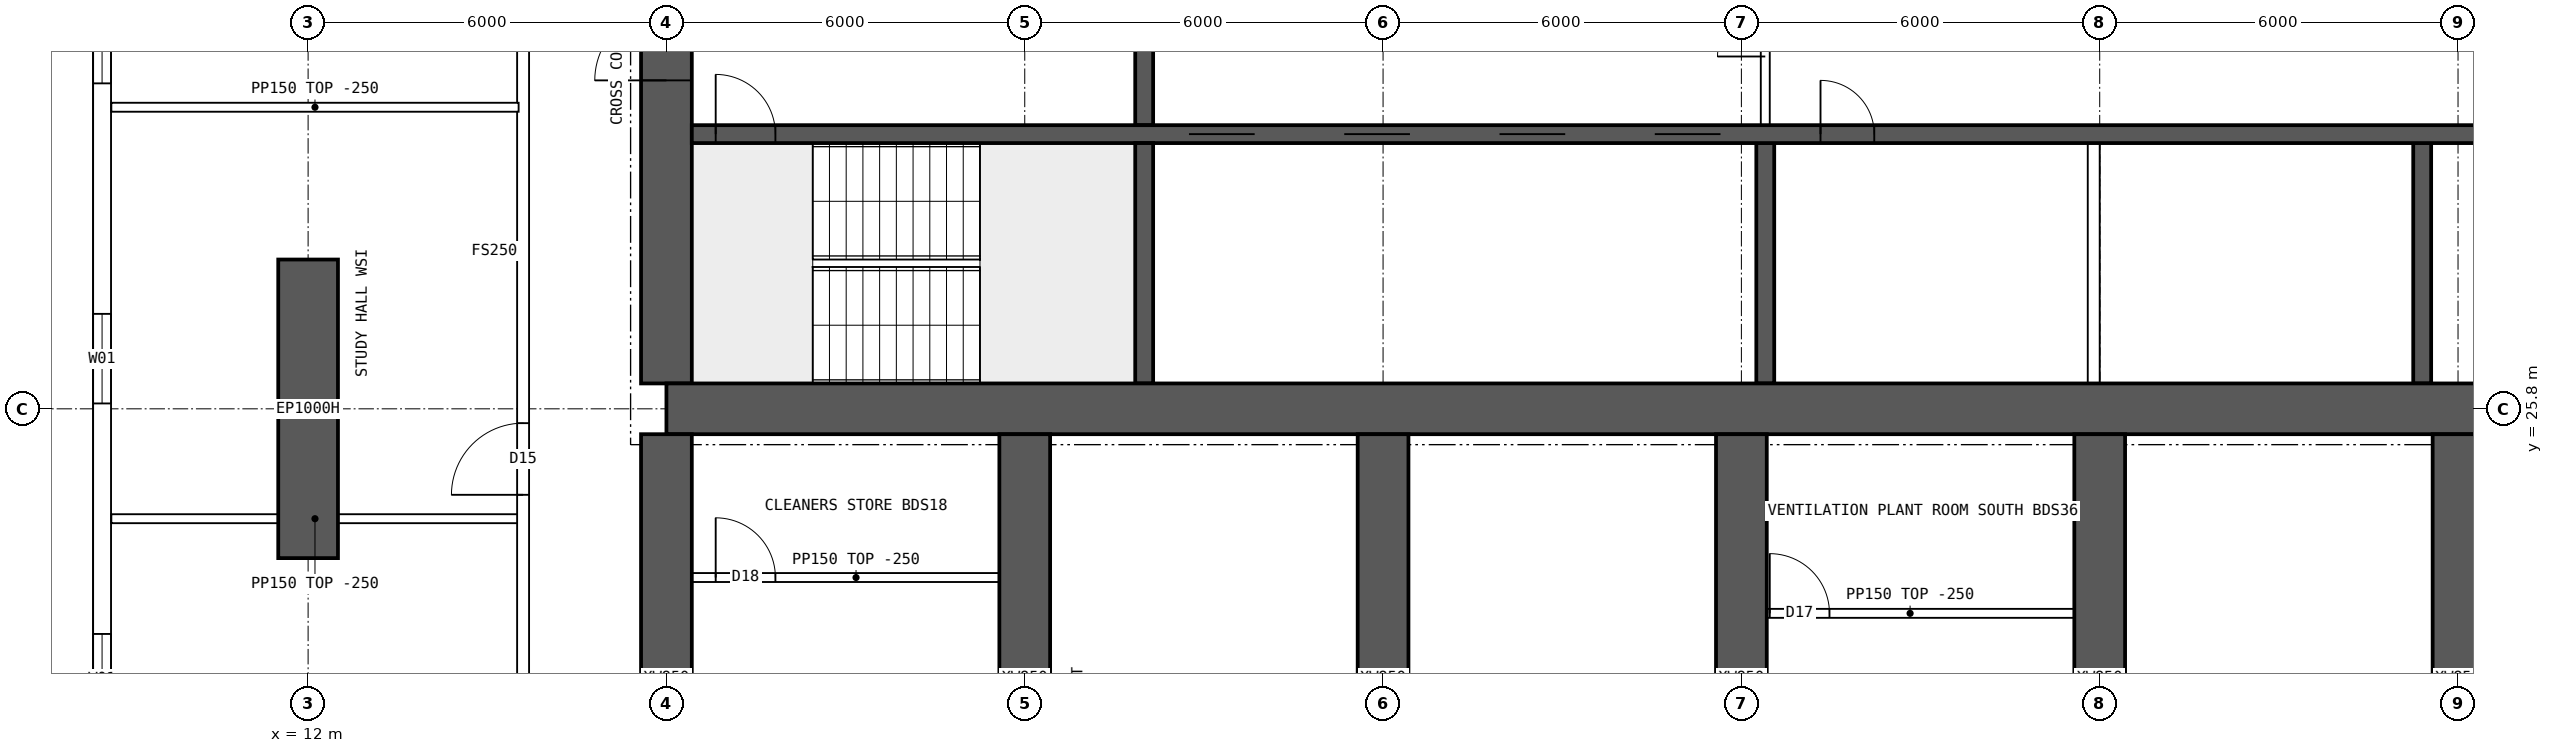
"""IFC4 building model, lengths in metres.
Left out: names, types, materials, properties, quantities, classifications, styles, units other than length and angle.
Written with IfcOpenShell. Run it as: python <this file> out.ifc"""

import sys

from ifc_helpers import new_model, si_unit, direction, frame, frame_2d, origin, place, context, subcontext, project, spatial, polyline, rectangle, outline, extrude, element, fill, save


model = new_model("IFC4")
c1 = context("Model", 3, precision=1e-05, world=origin(), true_north=direction((0.0, 1.0)))
c2 = subcontext(c1, "Body", "Model", "MODEL_VIEW")
j1 = project(units=[si_unit("LENGTHUNIT", "METRE"), si_unit("PLANEANGLEUNIT", "RADIAN")], contexts=[c1])
p1 = place(None, origin())
s1 = spatial("IfcSite", under=j1, at=p1, CompositionType="ELEMENT")
p2 = place(p1, origin())
s2 = spatial("IfcBuilding", under=s1, at=p2, CompositionType="ELEMENT")
p3 = place(p2, frame((0.0, 0.0, 167.35)))
s3 = spatial("IfcBuildingStorey", under=s2, at=p3, CompositionType="ELEMENT", Elevation=167.35)
p4 = place(p3, frame((12.0, 23.3, 0.0), z_axis=(0.0, 0.0, 1.0), x_axis=(0.0, 1.0, 0.0)))
e1 = element("IfcWall", 1, at=p4, inside=s3, PredefinedType="SHEAR", context=c2, shape_type="SweptSolid", body=[
    extrude(rectangle(XDim=5.0, YDim=1.0, at=frame_2d((2.5, 0.0))), origin(), (0.0, 0.0, 1.0), 3.75),
])
p5 = place(p3, frame((18.0, 25.8, 0.0), z_axis=(0.0, 0.0, 1.0), x_axis=(1.0, 0.0, 0.0)))
e2 = element("IfcWall", 2, at=p5, inside=s3, PredefinedType="SHEAR", context=c2, shape_type="SweptSolid", body=[
    extrude(rectangle(XDim=48.0, YDim=0.85, at=frame_2d((24.0, 0.0))), origin(), (0.0, 0.0, 1.0), 3.75),
])
p6 = place(p3, frame((18.0, 26.225, 0.0), z_axis=(0.0, 0.0, 1.0), x_axis=(0.0, 1.0, 0.0)))
e3 = element("IfcWall", 3, at=p6, inside=s3, PredefinedType="SHEAR", context=c2, shape_type="SweptSolid", body=[
    extrude(rectangle(XDim=11.55, YDim=0.85, at=frame_2d((5.775, 0.0))), origin(), (0.0, 0.0, 1.0), 3.75),
])
p7 = place(p6, frame((5.075, 0.0, 0.0)))
e4 = element("IfcOpeningElement", 4, at=p7, cuts=e3, PredefinedType="OPENING", context=c2, shape_type="SweptSolid", body=[
    extrude(rectangle(XDim=1.2, YDim=2.1, at=frame_2d((0.6, 1.05))), frame((0.0, 0.435, 0.0), z_axis=(0.0, -1.0, 0.0), x_axis=(1.0, 0.0, 0.0)), (0.0, 0.0, 1.0), 0.87),
])
p8 = place(p3, frame((18.425, 30.4, 0.0), z_axis=(0.0, 0.0, 1.0), x_axis=(1.0, 0.0, 0.0)))
e5 = element("IfcWall", 5, at=p8, inside=s3, PredefinedType="SHEAR", context=c2, shape_type="SweptSolid", body=[
    extrude(rectangle(XDim=47.15, YDim=0.3, at=frame_2d((23.575, 0.0))), origin(), (0.0, 0.0, 1.0), 3.75),
])
p9 = place(p8, frame((0.4, 0.0, 0.0)))
e6 = element("IfcOpeningElement", 6, at=p9, cuts=e5, PredefinedType="OPENING", context=c2, shape_type="SweptSolid", body=[
    extrude(rectangle(XDim=1.0, YDim=2.1, at=frame_2d((0.5, 1.05))), frame((0.0, 0.16, 0.0), z_axis=(0.0, -1.0, 0.0), x_axis=(1.0, 0.0, 0.0)), (0.0, 0.0, 1.0), 0.32),
])
p10 = place(p8, frame((45.75, 0.0, 0.0)))
e7 = element("IfcOpeningElement", 7, at=p10, cuts=e5, PredefinedType="OPENING", context=c2, shape_type="SweptSolid", body=[
    extrude(rectangle(XDim=1.0, YDim=2.1, at=frame_2d((0.5, 1.05))), frame((0.0, 0.16, 0.0), z_axis=(0.0, -1.0, 0.0), x_axis=(1.0, 0.0, 0.0)), (0.0, 0.0, 1.0), 0.32),
])
p11 = place(p8, frame((8.325, 0.0, 0.0)))
e8 = element("IfcOpeningElement", 8, at=p11, cuts=e5, PredefinedType="OPENING", context=c2, shape_type="SweptSolid", body=[
    extrude(rectangle(XDim=1.1, YDim=2.1, at=frame_2d((0.55, 1.05))), frame((0.0, 0.16, 0.0), z_axis=(0.0, -1.0, 0.0), x_axis=(1.0, 0.0, 0.0)), (0.0, 0.0, 1.0), 0.32),
])
p12 = place(p8, frame((10.925, 0.0, 0.0)))
e9 = element("IfcOpeningElement", 9, at=p12, cuts=e5, PredefinedType="OPENING", context=c2, shape_type="SweptSolid", body=[
    extrude(rectangle(XDim=1.1, YDim=2.1, at=frame_2d((0.55, 1.05))), frame((0.0, 0.16, 0.0), z_axis=(0.0, -1.0, 0.0), x_axis=(1.0, 0.0, 0.0)), (0.0, 0.0, 1.0), 0.32),
])
p13 = place(p8, frame((13.525, 0.0, 0.0)))
e10 = element("IfcOpeningElement", 10, at=p13, cuts=e5, PredefinedType="OPENING", context=c2, shape_type="SweptSolid", body=[
    extrude(rectangle(XDim=1.1, YDim=2.1, at=frame_2d((0.55, 1.05))), frame((0.0, 0.16, 0.0), z_axis=(0.0, -1.0, 0.0), x_axis=(1.0, 0.0, 0.0)), (0.0, 0.0, 1.0), 0.32),
])
p14 = place(p8, frame((16.125, 0.0, 0.0)))
e11 = element("IfcOpeningElement", 11, at=p14, cuts=e5, PredefinedType="OPENING", context=c2, shape_type="SweptSolid", body=[
    extrude(rectangle(XDim=1.1, YDim=2.1, at=frame_2d((0.55, 1.05))), frame((0.0, 0.16, 0.0), z_axis=(0.0, -1.0, 0.0), x_axis=(1.0, 0.0, 0.0)), (0.0, 0.0, 1.0), 0.32),
])
p15 = place(p8, frame((18.9, 0.0, 0.0)))
e12 = element("IfcOpeningElement", 12, at=p15, cuts=e5, PredefinedType="OPENING", context=c2, shape_type="SweptSolid", body=[
    extrude(rectangle(XDim=0.9, YDim=2.1, at=frame_2d((0.45, 1.05))), frame((0.0, 0.16, 0.0), z_axis=(0.0, -1.0, 0.0), x_axis=(1.0, 0.0, 0.0)), (0.0, 0.0, 1.0), 0.32),
])
p16 = place(p8, frame((30.192, 0.0, 0.0)))
e13 = element("IfcOpeningElement", 13, at=p16, cuts=e5, PredefinedType="OPENING", context=c2, shape_type="SweptSolid", body=[
    extrude(rectangle(XDim=1.1, YDim=2.1, at=frame_2d((0.55, 1.05))), frame((0.0, 0.16, 0.0), z_axis=(0.0, -1.0, 0.0), x_axis=(1.0, 0.0, 0.0)), (0.0, 0.0, 1.0), 0.32),
])
p17 = place(p8, frame((33.725, 0.0, 0.0)))
e14 = element("IfcOpeningElement", 14, at=p17, cuts=e5, PredefinedType="OPENING", context=c2, shape_type="SweptSolid", body=[
    extrude(rectangle(XDim=1.1, YDim=2.1, at=frame_2d((0.55, 1.05))), frame((0.0, 0.16, 0.0), z_axis=(0.0, -1.0, 0.0), x_axis=(1.0, 0.0, 0.0)), (0.0, 0.0, 1.0), 0.32),
])
p18 = place(p8, frame((37.258, 0.0, 0.0)))
e15 = element("IfcOpeningElement", 15, at=p18, cuts=e5, PredefinedType="OPENING", context=c2, shape_type="SweptSolid", body=[
    extrude(rectangle(XDim=1.1, YDim=2.1, at=frame_2d((0.55, 1.05))), frame((0.0, 0.16, 0.0), z_axis=(0.0, -1.0, 0.0), x_axis=(1.0, 0.0, 0.0)), (0.0, 0.0, 1.0), 0.32),
])
p19 = place(p3, frame((26.0, 26.225, 0.0), z_axis=(0.0, 0.0, 1.0), x_axis=(0.0, 1.0, 0.0)))
e16 = element("IfcWall", 16, at=p19, inside=s3, PredefinedType="SHEAR", context=c2, shape_type="SweptSolid", body=[
    extrude(rectangle(XDim=4.025, YDim=0.3, at=frame_2d((2.012, 0.0))), origin(), (0.0, 0.0, 1.0), 3.75),
])
p20 = place(p3, frame((26.0, 30.55, 0.0), z_axis=(0.0, 0.0, 1.0), x_axis=(0.0, 1.0, 0.0)))
e17 = element("IfcWall", 17, at=p20, inside=s3, PredefinedType="SHEAR", context=c2, shape_type="SweptSolid", body=[
    extrude(rectangle(XDim=3.9, YDim=0.3, at=frame_2d((1.95, 0.0))), origin(), (0.0, 0.0, 1.0), 3.75),
])
p21 = place(p20, frame((1.4, 0.0, 0.0)))
e18 = element("IfcOpeningElement", 18, at=p21, cuts=e17, PredefinedType="OPENING", context=c2, shape_type="SweptSolid", body=[
    extrude(rectangle(XDim=1.2, YDim=2.1, at=frame_2d((0.6, 1.05))), frame((0.0, 0.16, 0.0), z_axis=(0.0, -1.0, 0.0), x_axis=(1.0, 0.0, 0.0)), (0.0, 0.0, 1.0), 0.32),
])
for number, where, z_axis, x_axis in (
    (19, (36.4, 26.225, 0.0), (0.0, 0.0, 1.0), (0.0, 1.0, 0.0)),
    (20, (47.4, 26.225, 0.0), (0.0, 0.0, 1.0), (0.0, 1.0, 0.0)),
):
    element("IfcWall", number, at=place(p3, frame(where, z_axis=z_axis, x_axis=x_axis)), inside=s3, PredefinedType="SHEAR", context=c2, shape_type="SweptSolid", body=[
        extrude(rectangle(XDim=4.025, YDim=0.3, at=frame_2d((2.012, 0.0))), origin(), (0.0, 0.0, 1.0), 3.75),
    ])
for number, where, z_axis, x_axis in (
    (21, (18.0, 17.2, 0.0), (0.0, 0.0, 1.0), (0.0, 1.0, 0.0)),
    (22, (24.0, 17.2, 0.0), (0.0, 0.0, 1.0), (0.0, 1.0, 0.0)),
    (23, (30.0, 17.2, 0.0), (0.0, 0.0, 1.0), (0.0, 1.0, 0.0)),
    (24, (36.0, 17.2, 0.0), (0.0, 0.0, 1.0), (0.0, 1.0, 0.0)),
    (25, (42.0, 17.2, 0.0), (0.0, 0.0, 1.0), (0.0, 1.0, 0.0)),
    (26, (48.0, 17.2, 0.0), (0.0, 0.0, 1.0), (0.0, 1.0, 0.0)),
):
    element("IfcWall", number, at=place(p3, frame(where, z_axis=z_axis, x_axis=x_axis)), inside=s3, PredefinedType="SHEAR", context=c2, shape_type="SweptSolid", body=[
        extrude(rectangle(XDim=8.175, YDim=0.85, at=frame_2d((4.087, 0.0))), origin(), (0.0, 0.0, 1.0), 3.75),
    ])
p22 = place(p3, frame((8.55, 45.4, 0.0), z_axis=(0.0, 0.0, 1.0), x_axis=(0.0, -1.0, 0.0)))
e27 = element("IfcWall", 27, at=p22, inside=s3, PredefinedType="SOLIDWALL", context=c2, shape_type="SweptSolid", body=[
    extrude(outline(polyline([(-0.015, -0.15), (26.815, -0.15), (26.785, 0.15), (0.015, 0.15), (-0.015, -0.15)])), origin(), (0.0, 0.0, 1.0), 3.5),
])
p23 = place(p22, frame((1.93, 0.0, 0.9)))
e28 = element("IfcOpeningElement", 28, at=p23, cuts=e27, PredefinedType="OPENING", context=c2, shape_type="SweptSolid", body=[
    extrude(rectangle(XDim=1.5, YDim=2.0, at=frame_2d((0.75, 1.0))), frame((0.0, 0.16, 0.0), z_axis=(0.0, -1.0, 0.0), x_axis=(1.0, 0.0, 0.0)), (0.0, 0.0, 1.0), 0.32),
])
p24 = place(p22, frame((7.29, 0.0, 0.9)))
e29 = element("IfcOpeningElement", 29, at=p24, cuts=e27, PredefinedType="OPENING", context=c2, shape_type="SweptSolid", body=[
    extrude(rectangle(XDim=1.5, YDim=2.0, at=frame_2d((0.75, 1.0))), frame((0.0, 0.16, 0.0), z_axis=(0.0, -1.0, 0.0), x_axis=(1.0, 0.0, 0.0)), (0.0, 0.0, 1.0), 0.32),
])
p25 = place(p22, frame((12.65, 0.0, 0.9)))
e30 = element("IfcOpeningElement", 30, at=p25, cuts=e27, PredefinedType="OPENING", context=c2, shape_type="SweptSolid", body=[
    extrude(rectangle(XDim=1.5, YDim=2.0, at=frame_2d((0.75, 1.0))), frame((0.0, 0.16, 0.0), z_axis=(0.0, -1.0, 0.0), x_axis=(1.0, 0.0, 0.0)), (0.0, 0.0, 1.0), 0.32),
])
p26 = place(p22, frame((18.01, 0.0, 0.9)))
e31 = element("IfcOpeningElement", 31, at=p26, cuts=e27, PredefinedType="OPENING", context=c2, shape_type="SweptSolid", body=[
    extrude(rectangle(XDim=1.5, YDim=2.0, at=frame_2d((0.75, 1.0))), frame((0.0, 0.16, 0.0), z_axis=(0.0, -1.0, 0.0), x_axis=(1.0, 0.0, 0.0)), (0.0, 0.0, 1.0), 0.32),
])
p27 = place(p22, frame((23.37, 0.0, 0.9)))
e32 = element("IfcOpeningElement", 32, at=p27, cuts=e27, PredefinedType="OPENING", context=c2, shape_type="SweptSolid", body=[
    extrude(rectangle(XDim=1.5, YDim=2.0, at=frame_2d((0.75, 1.0))), frame((0.0, 0.16, 0.0), z_axis=(0.0, -1.0, 0.0), x_axis=(1.0, 0.0, 0.0)), (0.0, 0.0, 1.0), 0.32),
])
p28 = place(p3, frame((36.4, 30.55, 0.0), z_axis=(0.0, 0.0, 1.0), x_axis=(0.0, 1.0, 0.0)))
e33 = element("IfcWall", 33, at=p28, inside=s3, PredefinedType="SOLIDWALL", context=c2, shape_type="SweptSolid", body=[
    extrude(rectangle(XDim=3.9, YDim=0.15, at=frame_2d((1.95, 0.0))), origin(), (0.0, 0.0, 1.0), 3.5),
])
p29 = place(p28, frame((1.15, 0.0, 0.0)))
e34 = element("IfcOpeningElement", 34, at=p29, cuts=e33, PredefinedType="OPENING", context=c2, shape_type="SweptSolid", body=[
    extrude(rectangle(XDim=1.6, YDim=2.1, at=frame_2d((0.8, 1.05))), frame((0.0, 0.085, 0.0), z_axis=(0.0, -1.0, 0.0), x_axis=(1.0, 0.0, 0.0)), (0.0, 0.0, 1.0), 0.17),
])
p30 = place(p3, frame((41.9, 26.225, 0.0), z_axis=(0.0, 0.0, 1.0), x_axis=(0.0, 1.0, 0.0)))
e35 = element("IfcWall", 35, at=p30, inside=s3, PredefinedType="SOLIDWALL", context=c2, shape_type="SweptSolid", body=[
    extrude(rectangle(XDim=4.025, YDim=0.2, at=frame_2d((2.012, 0.0))), origin(), (0.0, 0.0, 1.0), 3.5),
])
p31 = place(p3, frame((18.425, 22.975, 0.0), z_axis=(0.0, 0.0, 1.0), x_axis=(1.0, 0.0, 0.0)))
e36 = element("IfcWall", 36, at=p31, inside=s3, PredefinedType="PARTITIONING", context=c2, shape_type="SweptSolid", body=[
    extrude(rectangle(XDim=5.5, YDim=0.15, at=frame_2d((2.75, 0.0))), origin(), (0.0, 0.0, 1.0), 3.5),
])
p32 = place(p31, frame((0.4, 0.0, 0.0)))
e37 = element("IfcOpeningElement", 37, at=p32, cuts=e36, PredefinedType="OPENING", context=c2, shape_type="SweptSolid", body=[
    extrude(rectangle(XDim=1.0, YDim=2.1, at=frame_2d((0.5, 1.05))), frame((0.0, 0.085, 0.0), z_axis=(0.0, -1.0, 0.0), x_axis=(1.0, 0.0, 0.0)), (0.0, 0.0, 1.0), 0.17),
])
p33 = place(p3, frame((36.075, 22.375, 0.0), z_axis=(0.0, 0.0, 1.0), x_axis=(1.0, 0.0, 0.0)))
e38 = element("IfcWall", 38, at=p33, inside=s3, PredefinedType="PARTITIONING", context=c2, shape_type="SweptSolid", body=[
    extrude(rectangle(XDim=5.5, YDim=0.15, at=frame_2d((2.75, 0.0))), origin(), (0.0, 0.0, 1.0), 3.5),
])
p34 = place(p33, frame((0.4, 0.0, 0.0)))
e39 = element("IfcOpeningElement", 39, at=p34, cuts=e38, PredefinedType="OPENING", context=c2, shape_type="SweptSolid", body=[
    extrude(rectangle(XDim=1.0, YDim=2.1, at=frame_2d((0.5, 1.05))), frame((0.0, 0.085, 0.0), z_axis=(0.0, -1.0, 0.0), x_axis=(1.0, 0.0, 0.0)), (0.0, 0.0, 1.0), 0.17),
])
p35 = place(p3, frame((8.705, 30.85, 0.0), z_axis=(0.0, 0.0, 1.0), x_axis=(1.0, 0.0, 0.0)))
e40 = element("IfcWall", 40, at=p35, inside=s3, PredefinedType="PARTITIONING", context=c2, shape_type="SweptSolid", body=[
    extrude(outline(polyline([(0.0, 0.0), (6.82, 0.0), (6.82, 3.5), (3.597, 3.5), (3.595, 3.05), (2.997, 3.05), (2.995, 3.5), (0.0, 3.5), (0.0, 0.0)])), frame((0.0, 0.075, 0.0), z_axis=(0.0, -1.0, 0.0), x_axis=(1.0, 0.0, 0.0)), (0.0, 0.0, 1.0), 0.15),
])
p36 = place(p3, frame((15.6, 10.446, 0.0), z_axis=(0.0, 0.0, 1.0), x_axis=(0.0, 1.0, 0.0)))
e41 = element("IfcWall", 41, at=p36, inside=s3, PredefinedType="SOLIDWALL", context=c2, shape_type="SweptSolid", body=[
    extrude(rectangle(XDim=43.107, YDim=0.2, at=frame_2d((21.554, 0.0))), origin(), (0.0, 0.0, 1.0), 3.5),
])
p37 = place(p36, frame((13.914, 0.0, 0.0)))
e42 = element("IfcOpeningElement", 42, at=p37, cuts=e41, PredefinedType="OPENING", context=c2, shape_type="SweptSolid", body=[
    extrude(rectangle(XDim=1.2, YDim=2.1, at=frame_2d((0.6, 1.05))), frame((0.0, 0.11, 0.0), z_axis=(0.0, -1.0, 0.0), x_axis=(1.0, 0.0, 0.0)), (0.0, 0.0, 1.0), 0.22),
])
p38 = place(p36, frame((5.104, 0.0, 0.0)))
e43 = element("IfcOpeningElement", 43, at=p38, cuts=e41, PredefinedType="OPENING", context=c2, shape_type="SweptSolid", body=[
    extrude(rectangle(XDim=1.4, YDim=2.1, at=frame_2d((0.7, 1.05))), frame((0.0, 0.11, 0.0), z_axis=(0.0, -1.0, 0.0), x_axis=(1.0, 0.0, 0.0)), (0.0, 0.0, 1.0), 0.22),
])
p39 = place(p36, frame((36.504, 0.0, 0.0)))
e44 = element("IfcOpeningElement", 44, at=p39, cuts=e41, PredefinedType="OPENING", context=c2, shape_type="SweptSolid", body=[
    extrude(rectangle(XDim=1.4, YDim=2.1, at=frame_2d((0.7, 1.05))), frame((0.0, 0.11, 0.0), z_axis=(0.0, -1.0, 0.0), x_axis=(1.0, 0.0, 0.0)), (0.0, 0.0, 1.0), 0.22),
])
p40 = place(p3, frame((8.705, 23.96, 0.0), z_axis=(0.0, 0.0, 1.0), x_axis=(1.0, 0.0, 0.0)))
e45 = element("IfcWall", 45, at=p40, inside=s3, PredefinedType="PARTITIONING", context=c2, shape_type="SweptSolid", body=[
    extrude(rectangle(XDim=6.82, YDim=0.15, at=frame_2d((3.41, 0.0))), origin(), (0.0, 0.0, 1.0), 3.5),
])
p41 = place(p25, origin())
e46 = element("IfcWindow", 46, at=p41, inside=s3, PartitioningType="SINGLE_PANEL", PredefinedType="WINDOW", context=c2, shape_type="SweptSolid", body=[
    extrude(rectangle(XDim=1.5, YDim=2.0, at=frame_2d((0.75, 1.0))), frame((0.0, 0.03, 0.0), z_axis=(0.0, -1.0, 0.0), x_axis=(1.0, 0.0, 0.0)), (0.0, 0.0, 1.0), 0.06),
])
fill(e30, e46)
p42 = place(p26, origin())
e47 = element("IfcWindow", 47, at=p42, inside=s3, PartitioningType="SINGLE_PANEL", PredefinedType="WINDOW", context=c2, shape_type="SweptSolid", body=[
    extrude(rectangle(XDim=1.5, YDim=2.0, at=frame_2d((0.75, 1.0))), frame((0.0, 0.03, 0.0), z_axis=(0.0, -1.0, 0.0), x_axis=(1.0, 0.0, 0.0)), (0.0, 0.0, 1.0), 0.06),
])
fill(e31, e47)
p43 = place(p27, origin())
e48 = element("IfcWindow", 48, at=p43, inside=s3, PartitioningType="SINGLE_PANEL", PredefinedType="WINDOW", context=c2, shape_type="SweptSolid", body=[
    extrude(rectangle(XDim=1.5, YDim=2.0, at=frame_2d((0.75, 1.0))), frame((0.0, 0.03, 0.0), z_axis=(0.0, -1.0, 0.0), x_axis=(1.0, 0.0, 0.0)), (0.0, 0.0, 1.0), 0.06),
])
fill(e32, e48)
p44 = place(p29, origin())
e49 = element("IfcDoor", 49, at=p44, inside=s3, OperationType="DOUBLE_DOOR_SINGLE_SWING", PredefinedType="DOOR", context=c2, shape_type="SweptSolid", body=[
    extrude(rectangle(XDim=1.6, YDim=2.1, at=frame_2d((0.8, 1.05))), frame((0.0, 0.025, 0.0), z_axis=(0.0, -1.0, 0.0), x_axis=(1.0, 0.0, 0.0)), (0.0, 0.0, 1.0), 0.05),
])
fill(e34, e49)
p45 = place(p7, origin())
e50 = element("IfcDoor", 50, at=p45, inside=s3, OperationType="SINGLE_SWING_LEFT", PredefinedType="DOOR", context=c2, shape_type="SweptSolid", body=[
    extrude(rectangle(XDim=1.2, YDim=2.1, at=frame_2d((0.6, 1.05))), frame((0.0, 0.025, 0.0), z_axis=(0.0, -1.0, 0.0), x_axis=(1.0, 0.0, 0.0)), (0.0, 0.0, 1.0), 0.05),
])
fill(e4, e50)
p46 = place(p9, origin())
e51 = element("IfcDoor", 51, at=p46, inside=s3, OperationType="SINGLE_SWING_LEFT", PredefinedType="DOOR", context=c2, shape_type="SweptSolid", body=[
    extrude(rectangle(XDim=1.0, YDim=2.1, at=frame_2d((0.5, 1.05))), frame((0.0, 0.025, 0.0), z_axis=(0.0, -1.0, 0.0), x_axis=(1.0, 0.0, 0.0)), (0.0, 0.0, 1.0), 0.05),
])
fill(e6, e51)
p47 = place(p11, origin())
e52 = element("IfcDoor", 52, at=p47, inside=s3, OperationType="DOUBLE_DOOR_SLIDING", PredefinedType="DOOR", context=c2, shape_type="SweptSolid", body=[
    extrude(rectangle(XDim=1.1, YDim=2.1, at=frame_2d((0.55, 1.05))), frame((0.0, 0.025, 0.0), z_axis=(0.0, -1.0, 0.0), x_axis=(1.0, 0.0, 0.0)), (0.0, 0.0, 1.0), 0.05),
])
fill(e8, e52)
p48 = place(p12, origin())
e53 = element("IfcDoor", 53, at=p48, inside=s3, OperationType="DOUBLE_DOOR_SLIDING", PredefinedType="DOOR", context=c2, shape_type="SweptSolid", body=[
    extrude(rectangle(XDim=1.1, YDim=2.1, at=frame_2d((0.55, 1.05))), frame((0.0, 0.025, 0.0), z_axis=(0.0, -1.0, 0.0), x_axis=(1.0, 0.0, 0.0)), (0.0, 0.0, 1.0), 0.05),
])
fill(e9, e53)
p49 = place(p13, origin())
e54 = element("IfcDoor", 54, at=p49, inside=s3, OperationType="DOUBLE_DOOR_SLIDING", PredefinedType="DOOR", context=c2, shape_type="SweptSolid", body=[
    extrude(rectangle(XDim=1.1, YDim=2.1, at=frame_2d((0.55, 1.05))), frame((0.0, 0.025, 0.0), z_axis=(0.0, -1.0, 0.0), x_axis=(1.0, 0.0, 0.0)), (0.0, 0.0, 1.0), 0.05),
])
fill(e10, e54)
p50 = place(p14, origin())
e55 = element("IfcDoor", 55, at=p50, inside=s3, OperationType="DOUBLE_DOOR_SLIDING", PredefinedType="DOOR", context=c2, shape_type="SweptSolid", body=[
    extrude(rectangle(XDim=1.1, YDim=2.1, at=frame_2d((0.55, 1.05))), frame((0.0, 0.025, 0.0), z_axis=(0.0, -1.0, 0.0), x_axis=(1.0, 0.0, 0.0)), (0.0, 0.0, 1.0), 0.05),
])
fill(e11, e55)
p51 = place(p15, origin())
e56 = element("IfcDoor", 56, at=p51, inside=s3, OperationType="SINGLE_SWING_LEFT", PredefinedType="DOOR", context=c2, shape_type="SweptSolid", body=[
    extrude(rectangle(XDim=0.9, YDim=2.1, at=frame_2d((0.45, 1.05))), frame((0.0, 0.025, 0.0), z_axis=(0.0, -1.0, 0.0), x_axis=(1.0, 0.0, 0.0)), (0.0, 0.0, 1.0), 0.05),
])
fill(e12, e56)
p52 = place(p32, origin())
e57 = element("IfcDoor", 57, at=p52, inside=s3, OperationType="SINGLE_SWING_LEFT", PredefinedType="DOOR", context=c2, shape_type="SweptSolid", body=[
    extrude(rectangle(XDim=1.0, YDim=2.1, at=frame_2d((0.5, 1.05))), frame((0.0, 0.025, 0.0), z_axis=(0.0, -1.0, 0.0), x_axis=(1.0, 0.0, 0.0)), (0.0, 0.0, 1.0), 0.05),
])
fill(e37, e57)
p53 = place(p34, origin())
e58 = element("IfcDoor", 58, at=p53, inside=s3, OperationType="SINGLE_SWING_LEFT", PredefinedType="DOOR", context=c2, shape_type="SweptSolid", body=[
    extrude(rectangle(XDim=1.0, YDim=2.1, at=frame_2d((0.5, 1.05))), frame((0.0, 0.025, 0.0), z_axis=(0.0, -1.0, 0.0), x_axis=(1.0, 0.0, 0.0)), (0.0, 0.0, 1.0), 0.05),
])
fill(e39, e58)
p54 = place(p37, origin())
e59 = element("IfcDoor", 59, at=p54, inside=s3, OperationType="SINGLE_SWING_LEFT", PredefinedType="DOOR", context=c2, shape_type="SweptSolid", body=[
    extrude(rectangle(XDim=1.2, YDim=2.1, at=frame_2d((0.6, 1.05))), frame((0.0, 0.025, 0.0), z_axis=(0.0, -1.0, 0.0), x_axis=(1.0, 0.0, 0.0)), (0.0, 0.0, 1.0), 0.05),
])
fill(e42, e59)
save(model, sys.argv[1])
